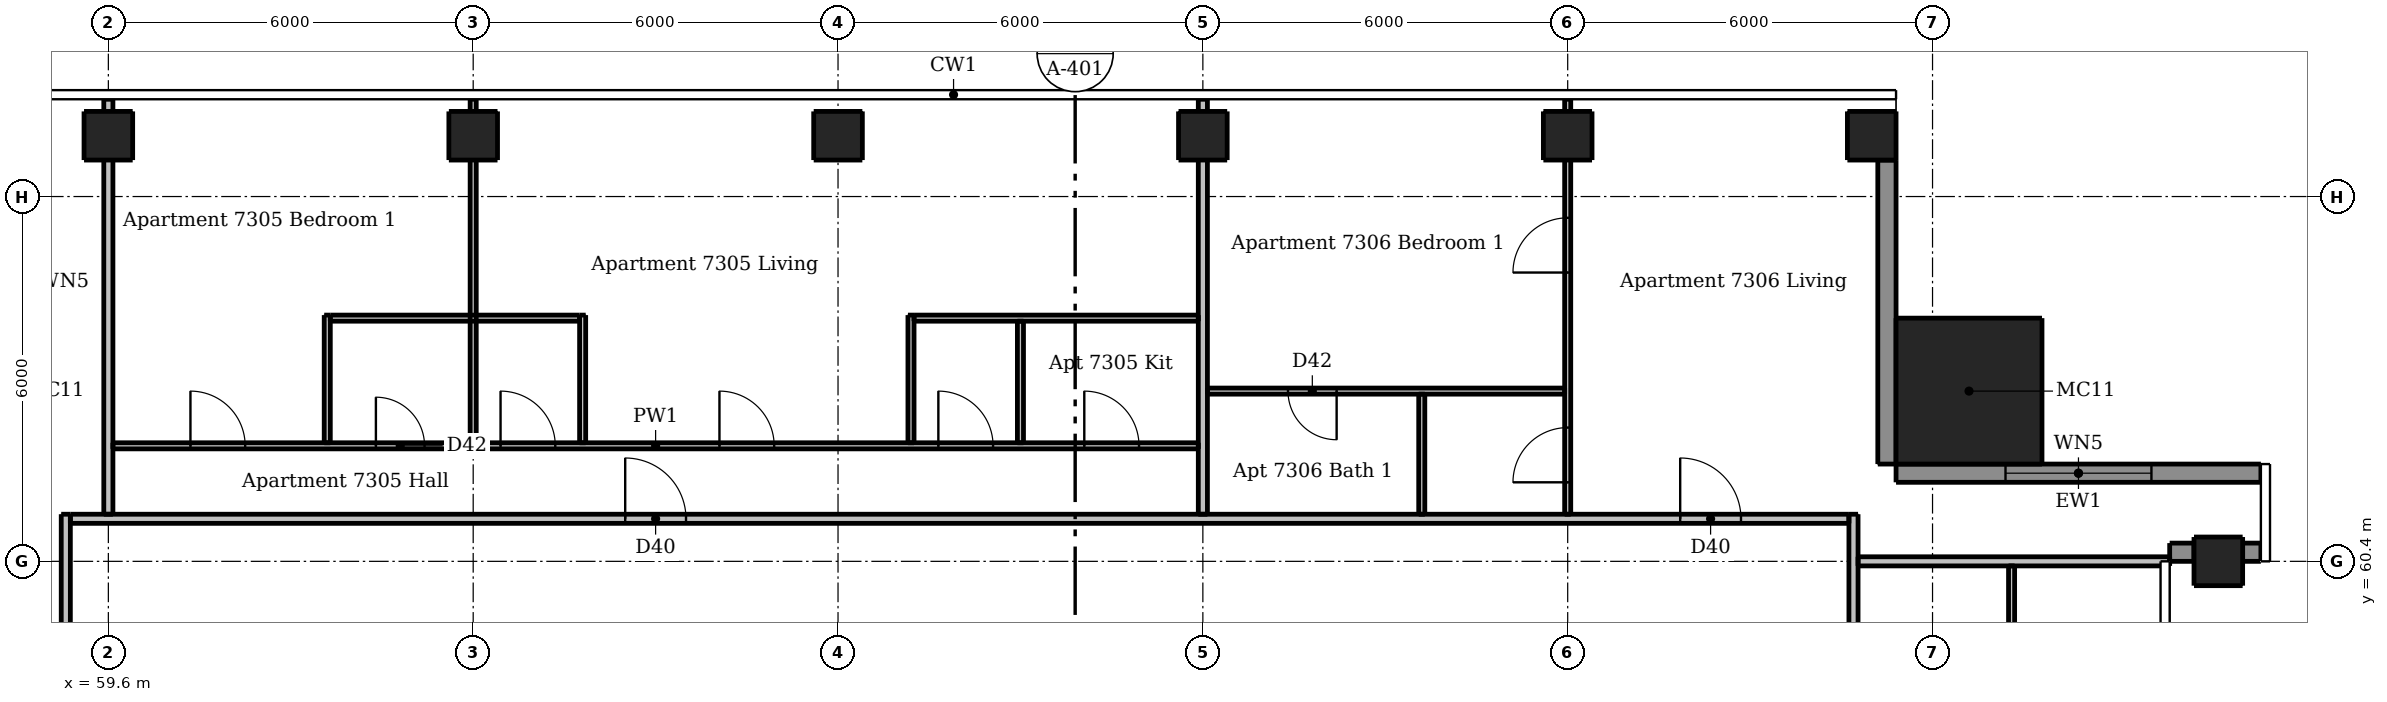
"""IFC4 building model, lengths in metres.
Left out: names, types, materials, properties, quantities, classifications, styles, units other than length and angle.
Written with IfcOpenShell. Run it as: python <this file> out.ifc"""

import sys

from ifc_helpers import new_model, si_unit, direction, frame, frame_2d, origin, origin_2d, place, context, subcontext, project, spatial, rectangle, extrude, element, fill, save


model = new_model("IFC4")
c1 = context("Model", 3, precision=1e-05, world=origin(), true_north=direction((0.0, 1.0)))
c2 = subcontext(c1, "Body", "Model", "MODEL_VIEW")
j1 = project(units=[si_unit("LENGTHUNIT", "METRE"), si_unit("PLANEANGLEUNIT", "RADIAN")], contexts=[c1])
p1 = place(None, origin())
s1 = spatial("IfcSite", under=j1, at=p1, CompositionType="ELEMENT")
p2 = place(p1, origin())
s2 = spatial("IfcBuilding", under=s1, at=p2, CompositionType="ELEMENT")
p3 = place(p2, frame((0.0, 0.0, 271.9)))
s3 = spatial("IfcBuildingStorey", under=s2, at=p3, CompositionType="ELEMENT", Elevation=271.9)
for number, where, z_axis, x_axis in (
    (1, (94.3, 60.4, 0.0), (0.0, 0.0, 1.0), (1.0, 0.0, 0.0)),
    (2, (59.6, 67.4, 0.0), (0.0, 0.0, 1.0), (1.0, 0.0, 0.0)),
    (3, (65.6, 67.4, 0.0), (0.0, 0.0, 1.0), (1.0, 0.0, 0.0)),
    (4, (71.6, 67.4, 0.0), (0.0, 0.0, 1.0), (1.0, 0.0, 0.0)),
    (5, (77.6, 67.4, 0.0), (0.0, 0.0, 1.0), (1.0, 0.0, 0.0)),
    (6, (83.6, 67.4, 0.0), (0.0, 0.0, 1.0), (1.0, 0.0, 0.0)),
    (7, (88.6, 67.4, 0.0), (0.0, 0.0, 1.0), (1.0, 0.0, 0.0)),
):
    element("IfcColumn", number, at=place(p3, frame(where, z_axis=z_axis, x_axis=x_axis)), inside=s3, PredefinedType="COLUMN", context=c2, shape_type="SweptSolid", body=[
        extrude(rectangle(XDim=0.8, YDim=0.8, at=origin_2d()), origin(), (0.0, 0.0, 1.0), 3.05),
    ])
p4 = place(p3, frame((90.2, 63.2, 0.0), z_axis=(0.0, 0.0, 1.0), x_axis=(1.0, 0.0, 0.0)))
e8 = element("IfcColumn", 8, at=p4, inside=s3, PredefinedType="COLUMN", context=c2, shape_type="SweptSolid", body=[
    extrude(rectangle(XDim=2.4, YDim=2.4, at=origin_2d()), origin(), (0.0, 0.0, 1.0), 3.3),
])
p5 = place(p3, frame((93.5, 60.55, 0.0), z_axis=(0.0, 0.0, 1.0), x_axis=(1.0, 0.0, 0.0)))
e9 = element("IfcWall", 9, at=p5, inside=s3, PredefinedType="SOLIDWALL", context=c2, shape_type="SweptSolid", body=[
    extrude(rectangle(XDim=0.4, YDim=0.3, at=frame_2d((0.2, 0.0))), origin(), (0.0, 0.0, 1.0), 3.05),
])
p6 = place(p3, frame((94.7, 60.55, 0.0), z_axis=(0.0, 0.0, 1.0), x_axis=(1.0, 0.0, 0.0)))
e10 = element("IfcWall", 10, at=p6, inside=s3, PredefinedType="SOLIDWALL", context=c2, shape_type="SweptSolid", body=[
    extrude(rectangle(XDim=0.3, YDim=0.3, at=frame_2d((0.15, 0.0))), origin(), (0.0, 0.0, 1.0), 3.05),
])
p7 = place(p3, frame((95.0, 61.85, 0.0), z_axis=(0.0, 0.0, 1.0), x_axis=(-1.0, 0.0, 0.0)))
e11 = element("IfcWall", 11, at=p7, inside=s3, PredefinedType="SOLIDWALL", context=c2, shape_type="SweptSolid", body=[
    extrude(rectangle(XDim=6.0, YDim=0.3, at=frame_2d((3.0, 0.0))), origin(), (0.0, 0.0, 1.0), 3.05),
])
p8 = place(p7, frame((1.8, 0.0, 0.15)))
e12 = element("IfcOpeningElement", 12, at=p8, cuts=e11, PredefinedType="OPENING", context=c2, shape_type="SweptSolid", body=[
    extrude(rectangle(XDim=2.4, YDim=2.1, at=frame_2d((1.2, 1.05))), frame((0.0, 0.16, 0.0), z_axis=(0.0, -1.0, 0.0), x_axis=(1.0, 0.0, 0.0)), (0.0, 0.0, 1.0), 0.32),
])
p9 = place(p3, frame((88.85, 62.0, 0.0), z_axis=(0.0, 0.0, 1.0), x_axis=(0.0, 1.0, 0.0)))
e13 = element("IfcWall", 13, at=p9, inside=s3, PredefinedType="SOLIDWALL", context=c2, shape_type="SweptSolid", body=[
    extrude(rectangle(XDim=5.0, YDim=0.3, at=frame_2d((2.5, 0.0))), origin(), (0.0, 0.0, 1.0), 3.05),
])
p10 = place(p3, frame((63.2, 62.35, 0.0), z_axis=(0.0, 0.0, 1.0), x_axis=(0.0, 1.0, 0.0)))
e14 = element("IfcWall", 14, at=p10, inside=s3, PredefinedType="PARTITIONING", context=c2, shape_type="SweptSolid", body=[
    extrude(rectangle(XDim=2.1, YDim=0.1, at=frame_2d((1.05, 0.0))), origin(), (0.0, 0.0, 1.0), 3.05),
])
p11 = place(p3, frame((65.6, 62.35, 0.0), z_axis=(0.0, 0.0, 1.0), x_axis=(0.0, 1.0, 0.0)))
e15 = element("IfcWall", 15, at=p11, inside=s3, PredefinedType="PARTITIONING", context=c2, shape_type="SweptSolid", body=[
    extrude(rectangle(XDim=5.65, YDim=0.1, at=frame_2d((2.825, 0.0))), origin(), (0.0, 0.0, 1.0), 2.516),
])
for number, where, z_axis, x_axis in (
    (16, (67.4, 62.35, 0.0), (0.0, 0.0, 1.0), (0.0, 1.0, 0.0)),
    (17, (72.8, 62.35, 0.0), (0.0, 0.0, 1.0), (0.0, 1.0, 0.0)),
):
    element("IfcWall", number, at=place(p3, frame(where, z_axis=z_axis, x_axis=x_axis)), inside=s3, PredefinedType="PARTITIONING", context=c2, shape_type="SweptSolid", body=[
        extrude(rectangle(XDim=2.1, YDim=0.1, at=frame_2d((1.05, 0.0))), origin(), (0.0, 0.0, 1.0), 3.05),
    ])
p12 = place(p3, frame((74.6, 62.35, 0.0), z_axis=(0.0, 0.0, 1.0), x_axis=(0.0, 1.0, 0.0)))
e18 = element("IfcWall", 18, at=p12, inside=s3, PredefinedType="PARTITIONING", context=c2, shape_type="SweptSolid", body=[
    extrude(rectangle(XDim=2.0, YDim=0.1, at=frame_2d((1.0, 0.0))), origin(), (0.0, 0.0, 1.0), 3.05),
])
p13 = place(p3, frame((81.2, 61.175, 0.0), z_axis=(0.0, 0.0, 1.0), x_axis=(0.0, 1.0, 0.0)))
e19 = element("IfcWall", 19, at=p13, inside=s3, PredefinedType="PARTITIONING", context=c2, shape_type="SweptSolid", body=[
    extrude(rectangle(XDim=1.975, YDim=0.1, at=frame_2d((0.987, 0.0))), origin(), (0.0, 0.0, 1.0), 3.05),
])
p14 = place(p3, frame((83.6, 61.175, 0.0), z_axis=(0.0, 0.0, 1.0), x_axis=(0.0, 1.0, 0.0)))
e20 = element("IfcWall", 20, at=p14, inside=s3, PredefinedType="PARTITIONING", context=c2, shape_type="SweptSolid", body=[
    extrude(rectangle(XDim=6.825, YDim=0.1, at=frame_2d((3.413, 0.0))), origin(), (0.0, 0.0, 1.0), 2.516),
])
p15 = place(p14, frame((0.525, 0.0, 0.0)))
e21 = element("IfcOpeningElement", 21, at=p15, cuts=e20, PredefinedType="OPENING", context=c2, shape_type="SweptSolid", body=[
    extrude(rectangle(XDim=0.9, YDim=2.1, at=frame_2d((0.45, 1.05))), frame((0.0, 0.06, 0.0), z_axis=(0.0, -1.0, 0.0), x_axis=(1.0, 0.0, 0.0)), (0.0, 0.0, 1.0), 0.12),
])
p16 = place(p14, frame((3.975, 0.0, 0.0)))
e22 = element("IfcOpeningElement", 22, at=p16, cuts=e20, PredefinedType="OPENING", context=c2, shape_type="SweptSolid", body=[
    extrude(rectangle(XDim=0.9, YDim=2.1, at=frame_2d((0.45, 1.05))), frame((0.0, 0.06, 0.0), z_axis=(0.0, -1.0, 0.0), x_axis=(1.0, 0.0, 0.0)), (0.0, 0.0, 1.0), 0.12),
])
p17 = place(p3, frame((90.9, 54.35, 0.0), z_axis=(0.0, 0.0, 1.0), x_axis=(0.0, 1.0, 0.0)))
e23 = element("IfcWall", 23, at=p17, inside=s3, PredefinedType="PARTITIONING", context=c2, shape_type="SweptSolid", body=[
    extrude(rectangle(XDim=5.975, YDim=0.1, at=frame_2d((2.987, 0.0))), origin(), (0.0, 0.0, 1.0), 3.05),
])
p18 = place(p17, frame((1.1, 0.0, 0.0)))
e24 = element("IfcOpeningElement", 24, at=p18, cuts=e23, PredefinedType="OPENING", context=c2, shape_type="SweptSolid", body=[
    extrude(rectangle(XDim=0.9, YDim=2.1, at=frame_2d((0.45, 1.05))), frame((0.0, 0.06, 0.0), z_axis=(0.0, -1.0, 0.0), x_axis=(1.0, 0.0, 0.0)), (0.0, 0.0, 1.0), 0.12),
])
p19 = place(p17, frame((4.15, 0.0, 0.0)))
e25 = element("IfcOpeningElement", 25, at=p19, cuts=e23, PredefinedType="OPENING", context=c2, shape_type="SweptSolid", body=[
    extrude(rectangle(XDim=0.8, YDim=2.1, at=frame_2d((0.4, 1.05))), frame((0.0, 0.06, 0.0), z_axis=(0.0, -1.0, 0.0), x_axis=(1.0, 0.0, 0.0)), (0.0, 0.0, 1.0), 0.12),
])
p20 = place(p3, frame((63.25, 64.4, 0.0), z_axis=(0.0, 0.0, 1.0), x_axis=(1.0, 0.0, 0.0)))
e26 = element("IfcWall", 26, at=p20, inside=s3, PredefinedType="PARTITIONING", context=c2, shape_type="SweptSolid", body=[
    extrude(rectangle(XDim=4.1, YDim=0.1, at=frame_2d((2.05, 0.0))), origin(), (0.0, 0.0, 1.0), 3.05),
])
p21 = place(p3, frame((72.85, 64.4, 0.0), z_axis=(0.0, 0.0, 1.0), x_axis=(1.0, 0.0, 0.0)))
e27 = element("IfcWall", 27, at=p21, inside=s3, PredefinedType="PARTITIONING", context=c2, shape_type="SweptSolid", body=[
    extrude(rectangle(XDim=4.675, YDim=0.1, at=frame_2d((2.337, 0.0))), origin(), (0.0, 0.0, 1.0), 3.05),
])
p22 = place(p3, frame((83.55, 63.2, 0.0), z_axis=(0.0, 0.0, 1.0), x_axis=(-1.0, 0.0, 0.0)))
e28 = element("IfcWall", 28, at=p22, inside=s3, PredefinedType="PARTITIONING", context=c2, shape_type="SweptSolid", body=[
    extrude(rectangle(XDim=5.875, YDim=0.1, at=frame_2d((2.938, 0.0))), origin(), (0.0, 0.0, 1.0), 3.05),
])
p23 = place(p22, frame((3.75, 0.0, 0.0)))
e29 = element("IfcOpeningElement", 29, at=p23, cuts=e28, PredefinedType="OPENING", context=c2, shape_type="SweptSolid", body=[
    extrude(rectangle(XDim=0.8, YDim=2.1, at=frame_2d((0.4, 1.05))), frame((0.0, 0.06, 0.0), z_axis=(0.0, -1.0, 0.0), x_axis=(1.0, 0.0, 0.0)), (0.0, 0.0, 1.0), 0.12),
])
p24 = place(p3, frame((59.675, 62.3, 0.0), z_axis=(0.0, 0.0, 1.0), x_axis=(1.0, 0.0, 0.0)))
e30 = element("IfcWall", 30, at=p24, inside=s3, PredefinedType="PARTITIONING", context=c2, shape_type="SweptSolid", body=[
    extrude(rectangle(XDim=17.85, YDim=0.1, at=frame_2d((8.925, 0.0))), origin(), (0.0, 0.0, 1.0), 3.05),
])
p25 = place(p24, frame((9.975, 0.0, 0.0)))
e31 = element("IfcOpeningElement", 31, at=p25, cuts=e30, PredefinedType="OPENING", context=c2, shape_type="SweptSolid", body=[
    extrude(rectangle(XDim=0.9, YDim=2.1, at=frame_2d((0.45, 1.05))), frame((0.0, 0.06, 0.0), z_axis=(0.0, -1.0, 0.0), x_axis=(1.0, 0.0, 0.0)), (0.0, 0.0, 1.0), 0.12),
])
p26 = place(p24, frame((15.975, 0.0, 0.0)))
e32 = element("IfcOpeningElement", 32, at=p26, cuts=e30, PredefinedType="OPENING", context=c2, shape_type="SweptSolid", body=[
    extrude(rectangle(XDim=0.9, YDim=2.1, at=frame_2d((0.45, 1.05))), frame((0.0, 0.06, 0.0), z_axis=(0.0, -1.0, 0.0), x_axis=(1.0, 0.0, 0.0)), (0.0, 0.0, 1.0), 0.12),
])
p27 = place(p24, frame((13.575, 0.0, 0.0)))
e33 = element("IfcOpeningElement", 33, at=p27, cuts=e30, PredefinedType="OPENING", context=c2, shape_type="SweptSolid", body=[
    extrude(rectangle(XDim=0.9, YDim=2.1, at=frame_2d((0.45, 1.05))), frame((0.0, 0.06, 0.0), z_axis=(0.0, -1.0, 0.0), x_axis=(1.0, 0.0, 0.0)), (0.0, 0.0, 1.0), 0.12),
])
p28 = place(p24, frame((6.375, 0.0, 0.0)))
e34 = element("IfcOpeningElement", 34, at=p28, cuts=e30, PredefinedType="OPENING", context=c2, shape_type="SweptSolid", body=[
    extrude(rectangle(XDim=0.9, YDim=2.1, at=frame_2d((0.45, 1.05))), frame((0.0, 0.06, 0.0), z_axis=(0.0, -1.0, 0.0), x_axis=(1.0, 0.0, 0.0)), (0.0, 0.0, 1.0), 0.12),
])
p29 = place(p24, frame((1.275, 0.0, 0.0)))
e35 = element("IfcOpeningElement", 35, at=p29, cuts=e30, PredefinedType="OPENING", context=c2, shape_type="SweptSolid", body=[
    extrude(rectangle(XDim=0.9, YDim=2.1, at=frame_2d((0.45, 1.05))), frame((0.0, 0.06, 0.0), z_axis=(0.0, -1.0, 0.0), x_axis=(1.0, 0.0, 0.0)), (0.0, 0.0, 1.0), 0.12),
])
p30 = place(p24, frame((4.325, 0.0, 0.0)))
e36 = element("IfcOpeningElement", 36, at=p30, cuts=e30, PredefinedType="OPENING", context=c2, shape_type="SweptSolid", body=[
    extrude(rectangle(XDim=0.8, YDim=2.1, at=frame_2d((0.4, 1.05))), frame((0.0, 0.06, 0.0), z_axis=(0.0, -1.0, 0.0), x_axis=(1.0, 0.0, 0.0)), (0.0, 0.0, 1.0), 0.12),
])
p31 = place(p3, frame((58.9, 30.325, 0.0), z_axis=(0.0, 0.0, 1.0), x_axis=(0.0, 1.0, 0.0)))
e37 = element("IfcWall", 37, at=p31, inside=s3, PredefinedType="PARTITIONING", context=c2, shape_type="SweptSolid", body=[
    extrude(rectangle(XDim=30.85, YDim=0.15, at=frame_2d((15.425, 0.0))), origin(), (0.0, 0.0, 1.0), 3.05),
])
p32 = place(p31, frame((9.225, 0.0, 0.0)))
e38 = element("IfcOpeningElement", 38, at=p32, cuts=e37, PredefinedType="OPENING", context=c2, shape_type="SweptSolid", body=[
    extrude(rectangle(XDim=1.0, YDim=2.1, at=frame_2d((0.5, 1.05))), frame((0.0, 0.085, 0.0), z_axis=(0.0, -1.0, 0.0), x_axis=(1.0, 0.0, 0.0)), (0.0, 0.0, 1.0), 0.17),
])
p33 = place(p31, frame((26.925, 0.0, 0.0)))
e39 = element("IfcOpeningElement", 39, at=p33, cuts=e37, PredefinedType="OPENING", context=c2, shape_type="SweptSolid", body=[
    extrude(rectangle(XDim=1.0, YDim=2.1, at=frame_2d((0.5, 1.05))), frame((0.0, 0.085, 0.0), z_axis=(0.0, -1.0, 0.0), x_axis=(1.0, 0.0, 0.0)), (0.0, 0.0, 1.0), 0.17),
])
p34 = place(p3, frame((59.6, 61.175, 0.0), z_axis=(0.0, 0.0, 1.0), x_axis=(0.0, 1.0, 0.0)))
e40 = element("IfcWall", 40, at=p34, inside=s3, PredefinedType="PARTITIONING", context=c2, shape_type="SweptSolid", body=[
    extrude(rectangle(XDim=6.825, YDim=0.15, at=frame_2d((3.413, 0.0))), origin(), (0.0, 0.0, 1.0), 2.51),
])
p35 = place(p3, frame((77.6, 61.175, 0.0), z_axis=(0.0, 0.0, 1.0), x_axis=(0.0, 1.0, 0.0)))
e41 = element("IfcWall", 41, at=p35, inside=s3, PredefinedType="PARTITIONING", context=c2, shape_type="SweptSolid", body=[
    extrude(rectangle(XDim=6.825, YDim=0.15, at=frame_2d((3.413, 0.0))), origin(), (0.0, 0.0, 1.0), 2.516),
])
p36 = place(p3, frame((88.3, 61.175, 0.0), z_axis=(0.0, 0.0, 1.0), x_axis=(0.0, -1.0, 0.0)))
e42 = element("IfcWall", 42, at=p36, inside=s3, PredefinedType="PARTITIONING", context=c2, shape_type="SweptSolid", body=[
    extrude(rectangle(XDim=29.4, YDim=0.15, at=frame_2d((14.7, 0.0))), origin(), (0.0, 0.0, 1.0), 3.05),
])
p37 = place(p36, frame((28.113, 0.0, 0.0)))
e43 = element("IfcOpeningElement", 43, at=p37, cuts=e42, PredefinedType="OPENING", context=c2, shape_type="SweptSolid", body=[
    extrude(rectangle(XDim=1.0, YDim=2.1, at=frame_2d((0.5, 1.05))), frame((0.0, 0.085, 0.0), z_axis=(0.0, -1.0, 0.0), x_axis=(1.0, 0.0, 0.0)), (0.0, 0.0, 1.0), 0.17),
])
p38 = place(p36, frame((10.775, 0.0, 0.0)))
e44 = element("IfcOpeningElement", 44, at=p38, cuts=e42, PredefinedType="OPENING", context=c2, shape_type="SweptSolid", body=[
    extrude(rectangle(XDim=1.0, YDim=2.1, at=frame_2d((0.5, 1.05))), frame((0.0, 0.085, 0.0), z_axis=(0.0, -1.0, 0.0), x_axis=(1.0, 0.0, 0.0)), (0.0, 0.0, 1.0), 0.17),
])
p39 = place(p3, frame((58.975, 61.1, 0.0), z_axis=(0.0, 0.0, 1.0), x_axis=(1.0, 0.0, 0.0)))
e45 = element("IfcWall", 45, at=p39, inside=s3, PredefinedType="PARTITIONING", context=c2, shape_type="SweptSolid", body=[
    extrude(rectangle(XDim=29.25, YDim=0.15, at=frame_2d((14.625, 0.0))), origin(), (0.0, 0.0, 1.0), 3.05),
])
p40 = place(p39, frame((9.125, 0.0, 0.0)))
e46 = element("IfcOpeningElement", 46, at=p40, cuts=e45, PredefinedType="OPENING", context=c2, shape_type="SweptSolid", body=[
    extrude(rectangle(XDim=1.0, YDim=2.1, at=frame_2d((0.5, 1.05))), frame((0.0, 0.085, 0.0), z_axis=(0.0, -1.0, 0.0), x_axis=(1.0, 0.0, 0.0)), (0.0, 0.0, 1.0), 0.17),
])
p41 = place(p39, frame((26.475, 0.0, 0.0)))
e47 = element("IfcOpeningElement", 47, at=p41, cuts=e45, PredefinedType="OPENING", context=c2, shape_type="SweptSolid", body=[
    extrude(rectangle(XDim=1.0, YDim=2.1, at=frame_2d((0.5, 1.05))), frame((0.0, 0.085, 0.0), z_axis=(0.0, -1.0, 0.0), x_axis=(1.0, 0.0, 0.0)), (0.0, 0.0, 1.0), 0.17),
])
p42 = place(p3, frame((88.375, 60.4, 0.0), z_axis=(0.0, 0.0, 1.0), x_axis=(1.0, 0.0, 0.0)))
e48 = element("IfcWall", 48, at=p42, inside=s3, PredefinedType="PARTITIONING", context=c2, shape_type="SweptSolid", body=[
    extrude(rectangle(XDim=5.125, YDim=0.15, at=frame_2d((2.562, 0.0))), origin(), (0.0, 0.0, 1.0), 2.647),
])
p43 = place(p8, origin())
e49 = element("IfcWindow", 49, at=p43, inside=s3, PartitioningType="DOUBLE_PANEL_VERTICAL", PredefinedType="WINDOW", context=c2, shape_type="SweptSolid", body=[
    extrude(rectangle(XDim=2.4, YDim=2.1, at=frame_2d((1.2, 1.05))), frame((0.0, 0.03, 0.0), z_axis=(0.0, -1.0, 0.0), x_axis=(1.0, 0.0, 0.0)), (0.0, 0.0, 1.0), 0.06),
])
fill(e12, e49)
p44 = place(p40, origin())
e50 = element("IfcDoor", 50, at=p44, inside=s3, OperationType="SINGLE_SWING_LEFT", PredefinedType="DOOR", context=c2, shape_type="SweptSolid", body=[
    extrude(rectangle(XDim=1.0, YDim=2.1, at=frame_2d((0.5, 1.05))), frame((0.0, 0.025, 0.0), z_axis=(0.0, -1.0, 0.0), x_axis=(1.0, 0.0, 0.0)), (0.0, 0.0, 1.0), 0.05),
])
fill(e46, e50)
p45 = place(p25, origin())
e51 = element("IfcDoor", 51, at=p45, inside=s3, OperationType="SINGLE_SWING_LEFT", PredefinedType="DOOR", context=c2, shape_type="SweptSolid", body=[
    extrude(rectangle(XDim=0.9, YDim=2.1, at=frame_2d((0.45, 1.05))), frame((0.0, 0.025, 0.0), z_axis=(0.0, -1.0, 0.0), x_axis=(1.0, 0.0, 0.0)), (0.0, 0.0, 1.0), 0.05),
])
fill(e31, e51)
p46 = place(p26, origin())
e52 = element("IfcDoor", 52, at=p46, inside=s3, OperationType="SINGLE_SWING_LEFT", PredefinedType="DOOR", context=c2, shape_type="SweptSolid", body=[
    extrude(rectangle(XDim=0.9, YDim=2.1, at=frame_2d((0.45, 1.05))), frame((0.0, 0.025, 0.0), z_axis=(0.0, -1.0, 0.0), x_axis=(1.0, 0.0, 0.0)), (0.0, 0.0, 1.0), 0.05),
])
fill(e32, e52)
p47 = place(p27, origin())
e53 = element("IfcDoor", 53, at=p47, inside=s3, OperationType="SINGLE_SWING_LEFT", PredefinedType="DOOR", context=c2, shape_type="SweptSolid", body=[
    extrude(rectangle(XDim=0.9, YDim=2.1, at=frame_2d((0.45, 1.05))), frame((0.0, 0.025, 0.0), z_axis=(0.0, -1.0, 0.0), x_axis=(1.0, 0.0, 0.0)), (0.0, 0.0, 1.0), 0.05),
])
fill(e33, e53)
p48 = place(p28, origin())
e54 = element("IfcDoor", 54, at=p48, inside=s3, OperationType="SINGLE_SWING_LEFT", PredefinedType="DOOR", context=c2, shape_type="SweptSolid", body=[
    extrude(rectangle(XDim=0.9, YDim=2.1, at=frame_2d((0.45, 1.05))), frame((0.0, 0.025, 0.0), z_axis=(0.0, -1.0, 0.0), x_axis=(1.0, 0.0, 0.0)), (0.0, 0.0, 1.0), 0.05),
])
fill(e34, e54)
p49 = place(p29, origin())
e55 = element("IfcDoor", 55, at=p49, inside=s3, OperationType="SINGLE_SWING_LEFT", PredefinedType="DOOR", context=c2, shape_type="SweptSolid", body=[
    extrude(rectangle(XDim=0.9, YDim=2.1, at=frame_2d((0.45, 1.05))), frame((0.0, 0.025, 0.0), z_axis=(0.0, -1.0, 0.0), x_axis=(1.0, 0.0, 0.0)), (0.0, 0.0, 1.0), 0.05),
])
fill(e35, e55)
p50 = place(p30, origin())
e56 = element("IfcDoor", 56, at=p50, inside=s3, OperationType="SINGLE_SWING_LEFT", PredefinedType="DOOR", context=c2, shape_type="SweptSolid", body=[
    extrude(rectangle(XDim=0.8, YDim=2.1, at=frame_2d((0.4, 1.05))), frame((0.0, 0.025, 0.0), z_axis=(0.0, -1.0, 0.0), x_axis=(1.0, 0.0, 0.0)), (0.0, 0.0, 1.0), 0.05),
])
fill(e36, e56)
p51 = place(p41, origin())
e57 = element("IfcDoor", 57, at=p51, inside=s3, OperationType="SINGLE_SWING_LEFT", PredefinedType="DOOR", context=c2, shape_type="SweptSolid", body=[
    extrude(rectangle(XDim=1.0, YDim=2.1, at=frame_2d((0.5, 1.05))), frame((0.0, 0.025, 0.0), z_axis=(0.0, -1.0, 0.0), x_axis=(1.0, 0.0, 0.0)), (0.0, 0.0, 1.0), 0.05),
])
fill(e47, e57)
p52 = place(p15, origin())
e58 = element("IfcDoor", 58, at=p52, inside=s3, OperationType="SINGLE_SWING_LEFT", PredefinedType="DOOR", context=c2, shape_type="SweptSolid", body=[
    extrude(rectangle(XDim=0.9, YDim=2.1, at=frame_2d((0.45, 1.05))), frame((0.0, 0.025, 0.0), z_axis=(0.0, -1.0, 0.0), x_axis=(1.0, 0.0, 0.0)), (0.0, 0.0, 1.0), 0.05),
])
fill(e21, e58)
p53 = place(p16, origin())
e59 = element("IfcDoor", 59, at=p53, inside=s3, OperationType="SINGLE_SWING_LEFT", PredefinedType="DOOR", context=c2, shape_type="SweptSolid", body=[
    extrude(rectangle(XDim=0.9, YDim=2.1, at=frame_2d((0.45, 1.05))), frame((0.0, 0.025, 0.0), z_axis=(0.0, -1.0, 0.0), x_axis=(1.0, 0.0, 0.0)), (0.0, 0.0, 1.0), 0.05),
])
fill(e22, e59)
p54 = place(p23, origin())
e60 = element("IfcDoor", 60, at=p54, inside=s3, OperationType="SINGLE_SWING_LEFT", PredefinedType="DOOR", context=c2, shape_type="SweptSolid", body=[
    extrude(rectangle(XDim=0.8, YDim=2.1, at=frame_2d((0.4, 1.05))), frame((0.0, 0.025, 0.0), z_axis=(0.0, -1.0, 0.0), x_axis=(1.0, 0.0, 0.0)), (0.0, 0.0, 1.0), 0.05),
])
fill(e29, e60)
save(model, sys.argv[1])
